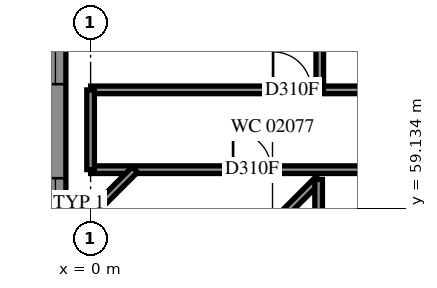
"""IFC4 building model, lengths in metres.
Left out: names, types, materials, properties, quantities, classifications, styles, units other than length and angle.
Written with IfcOpenShell. Run it as: python <this file> out.ifc"""

import sys

from ifc_helpers import new_model, si_unit, direction, frame, frame_2d, origin, place, context, subcontext, project, spatial, polyline, rectangle, outline, extrude, element, fill, save


model = new_model("IFC4")
c1 = context("Model", 3, precision=1e-05, world=origin(), true_north=direction((0.0, 1.0)))
c2 = subcontext(c1, "Body", "Model", "MODEL_VIEW")
j1 = project(units=[si_unit("LENGTHUNIT", "METRE"), si_unit("PLANEANGLEUNIT", "RADIAN")], contexts=[c1])
p1 = place(None, origin())
s1 = spatial("IfcSite", under=j1, at=p1, CompositionType="ELEMENT")
p2 = place(p1, origin())
s2 = spatial("IfcBuilding", under=s1, at=p2, CompositionType="ELEMENT")
p3 = place(p2, frame((0.0, 0.0, 10.2)))
s3 = spatial("IfcBuildingStorey", under=s2, at=p3, CompositionType="ELEMENT", Elevation=10.2)
p4 = place(p3, frame((-0.925, 71.725, 0.0), z_axis=(0.0, 0.0, 1.0), x_axis=(0.0, -1.0, 0.0)))
e1 = element("IfcWall", 1, at=p4, inside=s3, PredefinedType="SOLIDWALL", context=c2, shape_type="SweptSolid", body=[
    extrude(outline(polyline([(-0.275, -0.275), (28.525, -0.275), (27.975, 0.275), (0.275, 0.275), (-0.275, -0.275)])), origin(), (0.0, 0.0, 1.0), 3.8),
])
p5 = place(p4, frame((1.0, 0.0, 0.7)))
e2 = element("IfcOpeningElement", 2, at=p5, cuts=e1, PredefinedType="OPENING", context=c2, shape_type="SweptSolid", body=[
    extrude(rectangle(XDim=1.8, YDim=2.6, at=frame_2d((0.9, 1.3))), frame((0.0, 0.285, 0.0), z_axis=(0.0, -1.0, 0.0), x_axis=(1.0, 0.0, 0.0)), (0.0, 0.0, 1.0), 0.57),
])
p6 = place(p4, frame((4.225, 0.0, 0.7)))
e3 = element("IfcOpeningElement", 3, at=p6, cuts=e1, PredefinedType="OPENING", context=c2, shape_type="SweptSolid", body=[
    extrude(rectangle(XDim=1.8, YDim=2.6, at=frame_2d((0.9, 1.3))), frame((0.0, 0.285, 0.0), z_axis=(0.0, -1.0, 0.0), x_axis=(1.0, 0.0, 0.0)), (0.0, 0.0, 1.0), 0.57),
])
p7 = place(p4, frame((7.525, 0.0, 0.7)))
e4 = element("IfcOpeningElement", 4, at=p7, cuts=e1, PredefinedType="OPENING", context=c2, shape_type="SweptSolid", body=[
    extrude(rectangle(XDim=1.8, YDim=2.6, at=frame_2d((0.9, 1.3))), frame((0.0, 0.285, 0.0), z_axis=(0.0, -1.0, 0.0), x_axis=(1.0, 0.0, 0.0)), (0.0, 0.0, 1.0), 0.57),
])
p8 = place(p4, frame((14.725, 0.0, 0.7)))
e5 = element("IfcOpeningElement", 5, at=p8, cuts=e1, PredefinedType="OPENING", context=c2, shape_type="SweptSolid", body=[
    extrude(rectangle(XDim=1.8, YDim=2.6, at=frame_2d((0.9, 1.3))), frame((0.0, 0.285, 0.0), z_axis=(0.0, -1.0, 0.0), x_axis=(1.0, 0.0, 0.0)), (0.0, 0.0, 1.0), 0.57),
])
p9 = place(p4, frame((18.875, 0.0, 0.7)))
e6 = element("IfcOpeningElement", 6, at=p9, cuts=e1, PredefinedType="OPENING", context=c2, shape_type="SweptSolid", body=[
    extrude(rectangle(XDim=1.8, YDim=2.6, at=frame_2d((0.9, 1.3))), frame((0.0, 0.285, 0.0), z_axis=(0.0, -1.0, 0.0), x_axis=(1.0, 0.0, 0.0)), (0.0, 0.0, 1.0), 0.57),
])
p10 = place(p4, frame((21.625, 0.0, 0.7)))
e7 = element("IfcOpeningElement", 7, at=p10, cuts=e1, PredefinedType="OPENING", context=c2, shape_type="SweptSolid", body=[
    extrude(rectangle(XDim=1.8, YDim=2.6, at=frame_2d((0.9, 1.3))), frame((0.0, 0.285, 0.0), z_axis=(0.0, -1.0, 0.0), x_axis=(1.0, 0.0, 0.0)), (0.0, 0.0, 1.0), 0.57),
])
p11 = place(p4, frame((25.45, 0.0, 0.7)))
e8 = element("IfcOpeningElement", 8, at=p11, cuts=e1, PredefinedType="OPENING", context=c2, shape_type="SweptSolid", body=[
    extrude(rectangle(XDim=1.8, YDim=2.6, at=frame_2d((0.9, 1.3))), frame((0.0, 0.285, 0.0), z_axis=(0.0, -1.0, 0.0), x_axis=(1.0, 0.0, 0.0)), (0.0, 0.0, 1.0), 0.57),
])
p12 = place(p4, frame((11.8, 0.0, 0.45)))
e9 = element("IfcOpeningElement", 9, at=p12, cuts=e1, PredefinedType="OPENING", context=c2, shape_type="SweptSolid", body=[
    extrude(rectangle(XDim=1.3, YDim=2.5, at=frame_2d((0.65, 1.25))), frame((0.0, 0.285, 0.0), z_axis=(0.0, -1.0, 0.0), x_axis=(1.0, 0.0, 0.0)), (0.0, 0.0, 1.0), 0.57),
])
p13 = place(p3, frame((0.002, 60.15, 0.0), z_axis=(0.0, 0.0, 1.0), x_axis=(1.0, 0.0, 0.0)))
e10 = element("IfcWall", 10, at=p13, inside=s3, PredefinedType="PARTITIONING", context=c2, shape_type="SweptSolid", body=[
    extrude(rectangle(XDim=54.498, YDim=0.2, at=frame_2d((27.249, 0.0))), origin(), (0.0, 0.0, 1.0), 3.8),
])
p14 = place(p13, frame((8.667, 0.0, 0.0)))
e11 = element("IfcOpeningElement", 11, at=p14, cuts=e10, PredefinedType="OPENING", context=c2, shape_type="SweptSolid", body=[
    extrude(rectangle(XDim=1.0, YDim=2.1, at=frame_2d((0.5, 1.05))), frame((0.0, 0.11, 0.0), z_axis=(0.0, -1.0, 0.0), x_axis=(1.0, 0.0, 0.0)), (0.0, 0.0, 1.0), 0.22),
])
p15 = place(p13, frame((11.323, 0.0, 0.0)))
e12 = element("IfcOpeningElement", 12, at=p15, cuts=e10, PredefinedType="OPENING", context=c2, shape_type="SweptSolid", body=[
    extrude(rectangle(XDim=1.0, YDim=2.1, at=frame_2d((0.5, 1.05))), frame((0.0, 0.11, 0.0), z_axis=(0.0, -1.0, 0.0), x_axis=(1.0, 0.0, 0.0)), (0.0, 0.0, 1.0), 0.22),
])
p16 = place(p13, frame((16.163, 0.0, 0.0)))
e13 = element("IfcOpeningElement", 13, at=p16, cuts=e10, PredefinedType="OPENING", context=c2, shape_type="SweptSolid", body=[
    extrude(rectangle(XDim=1.0, YDim=2.1, at=frame_2d((0.5, 1.05))), frame((0.0, 0.11, 0.0), z_axis=(0.0, -1.0, 0.0), x_axis=(1.0, 0.0, 0.0)), (0.0, 0.0, 1.0), 0.22),
])
p17 = place(p13, frame((22.14, 0.0, 0.0)))
e14 = element("IfcOpeningElement", 14, at=p17, cuts=e10, PredefinedType="OPENING", context=c2, shape_type="SweptSolid", body=[
    extrude(rectangle(XDim=1.0, YDim=2.1, at=frame_2d((0.5, 1.05))), frame((0.0, 0.11, 0.0), z_axis=(0.0, -1.0, 0.0), x_axis=(1.0, 0.0, 0.0)), (0.0, 0.0, 1.0), 0.22),
])
p18 = place(p13, frame((30.563, 0.0, 0.0)))
e15 = element("IfcOpeningElement", 15, at=p18, cuts=e10, PredefinedType="OPENING", context=c2, shape_type="SweptSolid", body=[
    extrude(rectangle(XDim=1.0, YDim=2.1, at=frame_2d((0.5, 1.05))), frame((0.0, 0.11, 0.0), z_axis=(0.0, -1.0, 0.0), x_axis=(1.0, 0.0, 0.0)), (0.0, 0.0, 1.0), 0.22),
])
p19 = place(p13, frame((33.233, 0.0, 0.0)))
e16 = element("IfcOpeningElement", 16, at=p19, cuts=e10, PredefinedType="OPENING", context=c2, shape_type="SweptSolid", body=[
    extrude(rectangle(XDim=1.0, YDim=2.1, at=frame_2d((0.5, 1.05))), frame((0.0, 0.11, 0.0), z_axis=(0.0, -1.0, 0.0), x_axis=(1.0, 0.0, 0.0)), (0.0, 0.0, 1.0), 0.22),
])
p20 = place(p13, frame((38.073, 0.0, 0.0)))
e17 = element("IfcOpeningElement", 17, at=p20, cuts=e10, PredefinedType="OPENING", context=c2, shape_type="SweptSolid", body=[
    extrude(rectangle(XDim=1.0, YDim=2.1, at=frame_2d((0.5, 1.05))), frame((0.0, 0.11, 0.0), z_axis=(0.0, -1.0, 0.0), x_axis=(1.0, 0.0, 0.0)), (0.0, 0.0, 1.0), 0.22),
])
p21 = place(p13, frame((40.123, 0.0, 0.0)))
e18 = element("IfcOpeningElement", 18, at=p21, cuts=e10, PredefinedType="OPENING", context=c2, shape_type="SweptSolid", body=[
    extrude(rectangle(XDim=1.0, YDim=2.1, at=frame_2d((0.5, 1.05))), frame((0.0, 0.11, 0.0), z_axis=(0.0, -1.0, 0.0), x_axis=(1.0, 0.0, 0.0)), (0.0, 0.0, 1.0), 0.22),
])
p22 = place(p13, frame((44.963, 0.0, 0.0)))
e19 = element("IfcOpeningElement", 19, at=p22, cuts=e10, PredefinedType="OPENING", context=c2, shape_type="SweptSolid", body=[
    extrude(rectangle(XDim=1.0, YDim=2.1, at=frame_2d((0.5, 1.05))), frame((0.0, 0.11, 0.0), z_axis=(0.0, -1.0, 0.0), x_axis=(1.0, 0.0, 0.0)), (0.0, 0.0, 1.0), 0.22),
])
p23 = place(p13, frame((47.323, 0.0, 0.0)))
e20 = element("IfcOpeningElement", 20, at=p23, cuts=e10, PredefinedType="OPENING", context=c2, shape_type="SweptSolid", body=[
    extrude(rectangle(XDim=1.0, YDim=2.1, at=frame_2d((0.5, 1.05))), frame((0.0, 0.11, 0.0), z_axis=(0.0, -1.0, 0.0), x_axis=(1.0, 0.0, 0.0)), (0.0, 0.0, 1.0), 0.22),
])
p24 = place(p13, frame((3.747, 0.0, 0.0)))
e21 = element("IfcOpeningElement", 21, at=p24, cuts=e10, PredefinedType="OPENING", context=c2, shape_type="SweptSolid", body=[
    extrude(rectangle(XDim=1.0, YDim=2.1, at=frame_2d((0.5, 1.05))), frame((0.0, 0.11, 0.0), z_axis=(0.0, -1.0, 0.0), x_axis=(1.0, 0.0, 0.0)), (0.0, 0.0, 1.0), 0.22),
])
p25 = place(p3, frame((0.002, 62.25, 0.0), z_axis=(0.0, 0.0, 1.0), x_axis=(1.0, 0.0, 0.0)))
e22 = element("IfcWall", 22, at=p25, inside=s3, PredefinedType="PARTITIONING", context=c2, shape_type="SweptSolid", body=[
    extrude(rectangle(XDim=54.498, YDim=0.2, at=frame_2d((27.249, 0.0))), origin(), (0.0, 0.0, 1.0), 3.8),
])
p26 = place(p25, frame((8.667, 0.0, 0.0)))
e23 = element("IfcOpeningElement", 23, at=p26, cuts=e22, PredefinedType="OPENING", context=c2, shape_type="SweptSolid", body=[
    extrude(rectangle(XDim=1.0, YDim=2.1, at=frame_2d((0.5, 1.05))), frame((0.0, 0.11, 0.0), z_axis=(0.0, -1.0, 0.0), x_axis=(1.0, 0.0, 0.0)), (0.0, 0.0, 1.0), 0.22),
])
p27 = place(p25, frame((13.136, 0.0, 0.0)))
e24 = element("IfcOpeningElement", 24, at=p27, cuts=e22, PredefinedType="OPENING", context=c2, shape_type="SweptSolid", body=[
    extrude(rectangle(XDim=1.0, YDim=2.1, at=frame_2d((0.5, 1.05))), frame((0.0, 0.11, 0.0), z_axis=(0.0, -1.0, 0.0), x_axis=(1.0, 0.0, 0.0)), (0.0, 0.0, 1.0), 0.22),
])
p28 = place(p25, frame((20.335, 0.0, 0.0)))
e25 = element("IfcOpeningElement", 25, at=p28, cuts=e22, PredefinedType="OPENING", context=c2, shape_type="SweptSolid", body=[
    extrude(rectangle(XDim=1.0, YDim=2.1, at=frame_2d((0.5, 1.05))), frame((0.0, 0.11, 0.0), z_axis=(0.0, -1.0, 0.0), x_axis=(1.0, 0.0, 0.0)), (0.0, 0.0, 1.0), 0.22),
])
p29 = place(p25, frame((27.535, 0.0, 0.0)))
e26 = element("IfcOpeningElement", 26, at=p29, cuts=e22, PredefinedType="OPENING", context=c2, shape_type="SweptSolid", body=[
    extrude(rectangle(XDim=1.0, YDim=2.1, at=frame_2d((0.5, 1.05))), frame((0.0, 0.11, 0.0), z_axis=(0.0, -1.0, 0.0), x_axis=(1.0, 0.0, 0.0)), (0.0, 0.0, 1.0), 0.22),
])
p30 = place(p25, frame((34.736, 0.0, 0.0)))
e27 = element("IfcOpeningElement", 27, at=p30, cuts=e22, PredefinedType="OPENING", context=c2, shape_type="SweptSolid", body=[
    extrude(rectangle(XDim=1.0, YDim=2.1, at=frame_2d((0.5, 1.05))), frame((0.0, 0.11, 0.0), z_axis=(0.0, -1.0, 0.0), x_axis=(1.0, 0.0, 0.0)), (0.0, 0.0, 1.0), 0.22),
])
p31 = place(p25, frame((41.935, 0.0, 0.0)))
e28 = element("IfcOpeningElement", 28, at=p31, cuts=e22, PredefinedType="OPENING", context=c2, shape_type="SweptSolid", body=[
    extrude(rectangle(XDim=1.0, YDim=2.1, at=frame_2d((0.5, 1.05))), frame((0.0, 0.11, 0.0), z_axis=(0.0, -1.0, 0.0), x_axis=(1.0, 0.0, 0.0)), (0.0, 0.0, 1.0), 0.22),
])
p32 = place(p25, frame((49.136, 0.0, 0.0)))
e29 = element("IfcOpeningElement", 29, at=p32, cuts=e22, PredefinedType="OPENING", context=c2, shape_type="SweptSolid", body=[
    extrude(rectangle(XDim=1.0, YDim=2.1, at=frame_2d((0.5, 1.05))), frame((0.0, 0.11, 0.0), z_axis=(0.0, -1.0, 0.0), x_axis=(1.0, 0.0, 0.0)), (0.0, 0.0, 1.0), 0.22),
])
p33 = place(p25, frame((4.799, 0.0, 0.0)))
e30 = element("IfcOpeningElement", 30, at=p33, cuts=e22, PredefinedType="OPENING", context=c2, shape_type="SweptSolid", body=[
    extrude(rectangle(XDim=1.0, YDim=2.1, at=frame_2d((0.5, 1.05))), frame((0.0, 0.11, 0.0), z_axis=(0.0, -1.0, 0.0), x_axis=(1.0, 0.0, 0.0)), (0.0, 0.0, 1.0), 0.22),
])
p34 = place(p3, frame((6.03, 62.25, 0.0), z_axis=(0.0, 0.0, 1.0), x_axis=(0.0, 1.0, 0.0)))
e31 = element("IfcWall", 31, at=p34, inside=s3, PredefinedType="PARTITIONING", context=c2, shape_type="SweptSolid", body=[
    extrude(rectangle(XDim=10.4, YDim=0.2, at=frame_2d((5.2, 0.0))), origin(), (0.0, 0.0, 1.0), 3.8),
])
p35 = place(p3, frame((1.155, 55.051, 0.0), z_axis=(0.0, 0.0, 1.0), x_axis=(0.7071067812, 0.7071067812, 0.0)))
e32 = element("IfcWall", 32, at=p35, inside=s3, PredefinedType="PARTITIONING", context=c2, shape_type="SweptSolid", body=[
    extrude(rectangle(XDim=6.851, YDim=0.2, at=frame_2d((3.425, 0.0))), origin(), (0.0, 0.0, 1.0), 3.8),
])
p36 = place(p3, frame((6.0, 55.05, 0.0), z_axis=(0.0, 0.0, 1.0), x_axis=(0.0, 1.0, 0.0)))
e33 = element("IfcWall", 33, at=p36, inside=s3, PredefinedType="PARTITIONING", context=c2, shape_type="SweptSolid", body=[
    extrude(rectangle(XDim=4.844, YDim=0.2, at=frame_2d((2.422, 0.0))), origin(), (0.0, 0.0, 1.0), 3.8),
])
p37 = place(p3, frame((-0.65, 58.337, 0.0), z_axis=(0.0, 0.0, 1.0), x_axis=(0.7071067812, 0.7071067812, 0.0)))
e34 = element("IfcWall", 34, at=p37, inside=s3, PredefinedType="PARTITIONING", context=c2, shape_type="SweptSolid", body=[
    extrude(rectangle(XDim=2.565, YDim=0.2, at=frame_2d((1.282, 0.0))), origin(), (0.0, 0.0, 1.0), 3.8),
])
p38 = place(p3, frame((0.0, 60.152, 0.0), z_axis=(0.0, 0.0, 1.0), x_axis=(0.0, 1.0, 0.0)))
e35 = element("IfcWall", 35, at=p38, inside=s3, PredefinedType="PARTITIONING", context=c2, shape_type="SweptSolid", body=[
    extrude(rectangle(XDim=2.096, YDim=0.2, at=frame_2d((1.048, 0.0))), origin(), (0.0, 0.0, 1.0), 3.2),
])
p39 = place(p7, origin())
e36 = element("IfcWindow", 36, at=p39, inside=s3, PartitioningType="SINGLE_PANEL", PredefinedType="WINDOW", context=c2, shape_type="SweptSolid", body=[
    extrude(rectangle(XDim=1.8, YDim=2.6, at=frame_2d((0.9, 1.3))), frame((0.0, 0.155, 0.0), z_axis=(0.0, -1.0, 0.0), x_axis=(1.0, 0.0, 0.0)), (0.0, 0.0, 1.0), 0.06),
])
fill(e4, e36)
p40 = place(p33, origin())
e37 = element("IfcDoor", 37, at=p40, inside=s3, OperationType="SINGLE_SWING_LEFT", PredefinedType="DOOR", context=c2, shape_type="SweptSolid", body=[
    extrude(rectangle(XDim=1.0, YDim=2.1, at=frame_2d((0.5, 1.05))), frame((0.0, 0.025, 0.0), z_axis=(0.0, -1.0, 0.0), x_axis=(1.0, 0.0, 0.0)), (0.0, 0.0, 1.0), 0.05),
])
fill(e30, e37)
p41 = place(p24, origin())
e38 = element("IfcDoor", 38, at=p41, inside=s3, OperationType="SINGLE_SWING_LEFT", PredefinedType="DOOR", context=c2, shape_type="SweptSolid", body=[
    extrude(rectangle(XDim=1.0, YDim=2.1, at=frame_2d((0.5, 1.05))), frame((0.0, 0.025, 0.0), z_axis=(0.0, -1.0, 0.0), x_axis=(1.0, 0.0, 0.0)), (0.0, 0.0, 1.0), 0.05),
])
fill(e21, e38)
p42 = place(p12, origin())
e39 = element("IfcWindow", 39, at=p42, inside=s3, PartitioningType="SINGLE_PANEL", PredefinedType="WINDOW", context=c2, shape_type="SweptSolid", body=[
    extrude(rectangle(XDim=1.3, YDim=2.5, at=frame_2d((0.65, 1.25))), frame((0.0, 0.155, 0.0), z_axis=(0.0, -1.0, 0.0), x_axis=(1.0, 0.0, 0.0)), (0.0, 0.0, 1.0), 0.06),
])
fill(e9, e39)
save(model, sys.argv[1])
